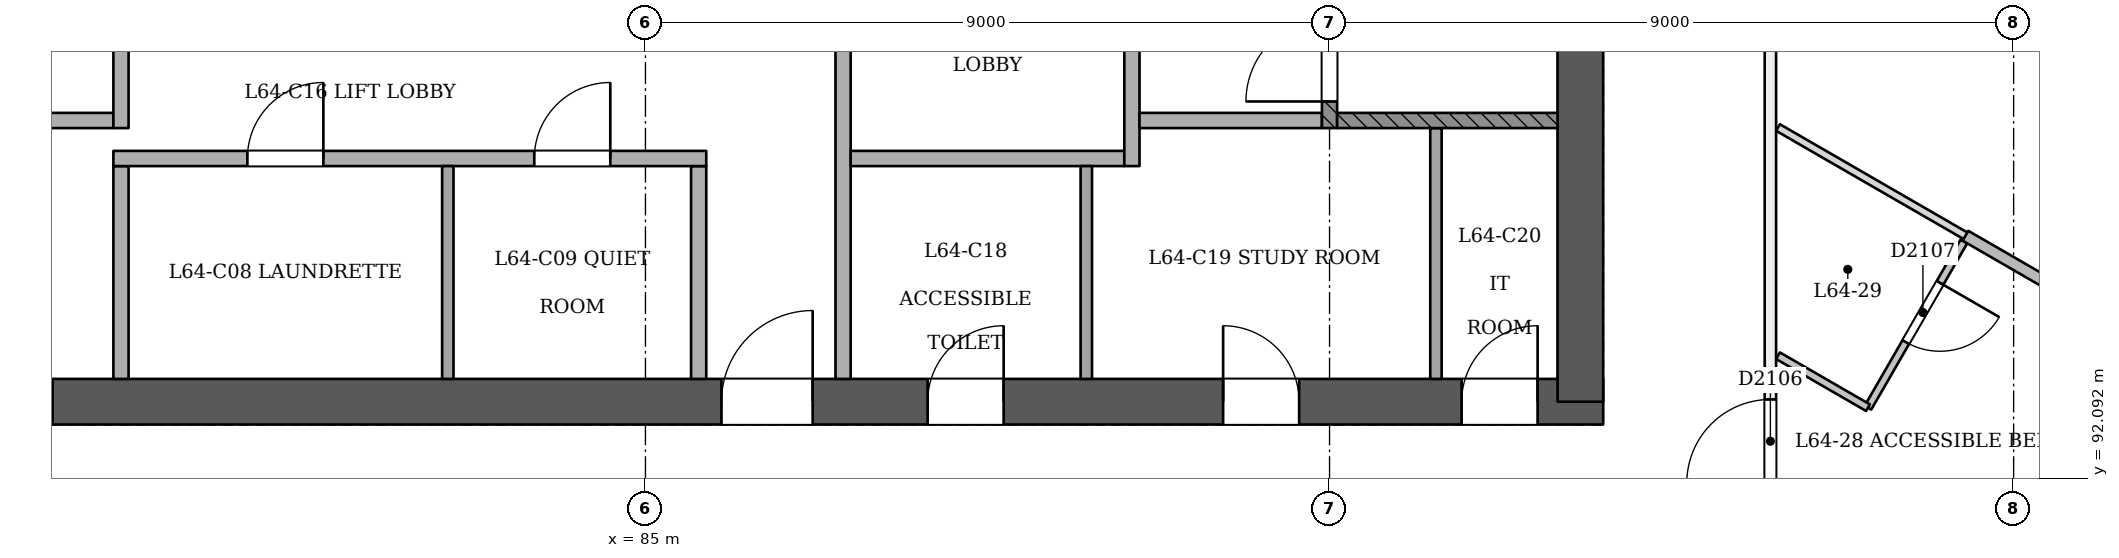
"""IFC4 building model, lengths in metres.
Left out: names, types, materials, properties, quantities, classifications, styles, units other than length and angle.
Written with IfcOpenShell. Run it as: python <this file> out.ifc"""

import sys

from ifc_helpers import new_model, si_unit, direction, frame, frame_2d, origin, place, context, subcontext, project, spatial, rectangle, extrude, element, fill, save


model = new_model("IFC4")
c1 = context("Model", 3, precision=1e-05, world=origin(), true_north=direction((0.0, 1.0)))
c2 = subcontext(c1, "Body", "Model", "MODEL_VIEW")
j1 = project(units=[si_unit("LENGTHUNIT", "METRE"), si_unit("PLANEANGLEUNIT", "RADIAN")], contexts=[c1])
p1 = place(None, origin())
s1 = spatial("IfcSite", under=j1, at=p1, CompositionType="ELEMENT")
p2 = place(p1, origin())
s2 = spatial("IfcBuilding", under=s1, at=p2, CompositionType="ELEMENT")
p3 = place(p2, frame((0.0, 0.0, 250.0)))
s3 = spatial("IfcBuildingStorey", under=s2, at=p3, CompositionType="ELEMENT", Elevation=250.0)
p4 = place(p3, frame((72.7, 93.1, 0.0), z_axis=(0.0, 0.0, 1.0), x_axis=(1.0, 0.0, 0.0)))
e1 = element("IfcWall", 1, at=p4, inside=s3, PredefinedType="SHEAR", context=c2, shape_type="SweptSolid", body=[
    extrude(rectangle(XDim=24.9, YDim=0.6, at=frame_2d((12.45, 0.0))), origin(), (0.0, 0.0, 1.0), 3.6),
])
p5 = place(p4, frame((1.1, 0.0, 0.0)))
e2 = element("IfcOpeningElement", 2, at=p5, cuts=e1, PredefinedType="OPENING", context=c2, shape_type="SweptSolid", body=[
    extrude(rectangle(XDim=1.2, YDim=2.1, at=frame_2d((0.6, 1.05))), frame((0.0, 0.311, 0.0), z_axis=(0.0, -1.0, 0.0), x_axis=(1.0, 0.0, 0.0)), (0.0, 0.0, 1.0), 0.621),
])
p6 = place(p4, frame((3.3, 0.0, 0.0)))
e3 = element("IfcOpeningElement", 3, at=p6, cuts=e1, PredefinedType="OPENING", context=c2, shape_type="SweptSolid", body=[
    extrude(rectangle(XDim=1.2, YDim=2.1, at=frame_2d((0.6, 1.05))), frame((0.0, 0.311, 0.0), z_axis=(0.0, -1.0, 0.0), x_axis=(1.0, 0.0, 0.0)), (0.0, 0.0, 1.0), 0.621),
])
p7 = place(p4, frame((13.3, 0.0, 0.0)))
e4 = element("IfcOpeningElement", 4, at=p7, cuts=e1, PredefinedType="OPENING", context=c2, shape_type="SweptSolid", body=[
    extrude(rectangle(XDim=1.2, YDim=2.1, at=frame_2d((0.6, 1.05))), frame((0.0, 0.311, 0.0), z_axis=(0.0, -1.0, 0.0), x_axis=(1.0, 0.0, 0.0)), (0.0, 0.0, 1.0), 0.621),
])
p8 = place(p4, frame((16.012, 0.0, 0.0)))
e5 = element("IfcOpeningElement", 5, at=p8, cuts=e1, PredefinedType="OPENING", context=c2, shape_type="SweptSolid", body=[
    extrude(rectangle(XDim=1.0, YDim=2.1, at=frame_2d((0.5, 1.05))), frame((0.0, 0.311, 0.0), z_axis=(0.0, -1.0, 0.0), x_axis=(1.0, 0.0, 0.0)), (0.0, 0.0, 1.0), 0.621),
])
p9 = place(p4, frame((19.9, 0.0, 0.0)))
e6 = element("IfcOpeningElement", 6, at=p9, cuts=e1, PredefinedType="OPENING", context=c2, shape_type="SweptSolid", body=[
    extrude(rectangle(XDim=1.0, YDim=2.1, at=frame_2d((0.5, 1.05))), frame((0.0, 0.311, 0.0), z_axis=(0.0, -1.0, 0.0), x_axis=(1.0, 0.0, 0.0)), (0.0, 0.0, 1.0), 0.621),
])
p10 = place(p4, frame((23.038, 0.0, 0.0)))
e7 = element("IfcOpeningElement", 7, at=p10, cuts=e1, PredefinedType="OPENING", context=c2, shape_type="SweptSolid", body=[
    extrude(rectangle(XDim=1.0, YDim=2.1, at=frame_2d((0.5, 1.05))), frame((0.0, 0.311, 0.0), z_axis=(0.0, -1.0, 0.0), x_axis=(1.0, 0.0, 0.0)), (0.0, 0.0, 1.0), 0.621),
])
p11 = place(p3, frame((97.3, 93.1, 0.0), z_axis=(0.0, 0.0, 1.0), x_axis=(0.0, 1.0, 0.0)))
e8 = element("IfcWall", 8, at=p11, inside=s3, PredefinedType="SHEAR", context=c2, shape_type="SweptSolid", body=[
    extrude(rectangle(XDim=10.9, YDim=0.6, at=frame_2d((5.45, 0.0))), origin(), (0.0, 0.0, 1.0), 3.6),
])
p12 = place(p3, frame((99.8, 91.569, 0.0), z_axis=(0.0, 0.0, 1.0), x_axis=(0.0, 1.0, 0.0)))
e9 = element("IfcWall", 9, at=p12, inside=s3, PredefinedType="PARTITIONING", context=c2, shape_type="SweptSolid", body=[
    extrude(rectangle(XDim=6.23, YDim=0.15, at=frame_2d((3.115, 0.0))), origin(), (0.0, 0.0, 1.0), 3.2),
])
p13 = place(p12, frame((0.461, 0.0, 0.0)))
e10 = element("IfcOpeningElement", 10, at=p13, cuts=e9, PredefinedType="OPENING", context=c2, shape_type="SweptSolid", body=[
    extrude(rectangle(XDim=1.1, YDim=2.1, at=frame_2d((0.55, 1.05))), frame((0.0, 0.085, 0.0), z_axis=(0.0, -1.0, 0.0), x_axis=(1.0, 0.0, 0.0)), (0.0, 0.0, 1.0), 0.171),
])
p14 = place(p3, frame((102.346, 95.208, 0.0), z_axis=(0.0, 0.0, 1.0), x_axis=(-0.499976333282, -0.866039067339, 0.0)))
e11 = element("IfcWall", 11, at=p14, inside=s3, PredefinedType="PARTITIONING", context=c2, shape_type="SweptSolid", body=[
    extrude(rectangle(XDim=2.525, YDim=0.1, at=frame_2d((1.262, 0.0))), origin(), (0.0, 0.0, 1.0), 3.2),
])
p15 = place(p14, frame((0.629, 0.0, 0.0)))
e12 = element("IfcOpeningElement", 12, at=p15, cuts=e11, PredefinedType="OPENING", context=c2, shape_type="SweptSolid", body=[
    extrude(rectangle(XDim=0.9, YDim=2.1, at=frame_2d((0.45, 1.05))), frame((0.0, 0.061, 0.0), z_axis=(0.0, -1.0, 0.0), x_axis=(1.0, 0.0, 0.0)), (0.0, 0.0, 1.0), 0.121),
])
p16 = place(p3, frame((101.083, 93.022, 0.0), z_axis=(0.0, 0.0, 1.0), x_axis=(-0.8660249478, 0.500000789788, 0.0)))
e13 = element("IfcWall", 13, at=p16, inside=s3, PredefinedType="PARTITIONING", context=c2, shape_type="SweptSolid", body=[
    extrude(rectangle(XDim=1.367, YDim=0.1, at=frame_2d((0.683, 0.0))), origin(), (0.0, 0.0, 1.0), 3.2),
])
p17 = place(p3, frame((104.895, 93.823, 0.0), z_axis=(0.0, 0.0, 1.0), x_axis=(-0.866032430508, 0.49998782916, 0.0)))
e14 = element("IfcWall", 14, at=p17, inside=s3, PredefinedType="PARTITIONING", context=c2, shape_type="SweptSolid", body=[
    extrude(rectangle(XDim=2.92, YDim=0.15, at=frame_2d((1.46, 0.0))), origin(), (0.0, 0.0, 1.0), 2.7),
])
p18 = place(p3, frame((102.401, 95.263, 0.0), z_axis=(0.0, 0.0, 1.0), x_axis=(-0.866039173598, 0.499976149225, 0.0)))
e15 = element("IfcWall", 15, at=p18, inside=s3, PredefinedType="PARTITIONING", context=c2, shape_type="SweptSolid", body=[
    extrude(rectangle(XDim=2.888, YDim=0.1, at=frame_2d((1.444, 0.0))), origin(), (0.0, 0.0, 1.0), 3.2),
])
p19 = place(p3, frame((78.1, 93.4, 0.0), z_axis=(0.0, 0.0, 1.0), x_axis=(0.0, 1.0, 0.0)))
e16 = element("IfcWall", 16, at=p19, inside=s3, PredefinedType="PARTITIONING", context=c2, shape_type="SweptSolid", body=[
    extrude(rectangle(XDim=2.8, YDim=0.2, at=frame_2d((1.4, 0.0))), origin(), (0.0, 0.0, 1.0), 3.2),
])
p20 = place(p3, frame((82.4, 93.4, 0.0), z_axis=(0.0, 0.0, 1.0), x_axis=(0.0, 1.0, 0.0)))
e17 = element("IfcWall", 17, at=p20, inside=s3, PredefinedType="PARTITIONING", context=c2, shape_type="SweptSolid", body=[
    extrude(rectangle(XDim=2.8, YDim=0.15, at=frame_2d((1.4, 0.0))), origin(), (0.0, 0.0, 1.0), 3.2),
])
p21 = place(p3, frame((85.7, 93.4, 0.0), z_axis=(0.0, 0.0, 1.0), x_axis=(0.0, 1.0, 0.0)))
e18 = element("IfcWall", 18, at=p21, inside=s3, PredefinedType="PARTITIONING", context=c2, shape_type="SweptSolid", body=[
    extrude(rectangle(XDim=2.8, YDim=0.2, at=frame_2d((1.4, 0.0))), origin(), (0.0, 0.0, 1.0), 3.2),
])
p22 = place(p3, frame((87.6, 93.4, 0.0), z_axis=(0.0, 0.0, 1.0), x_axis=(0.0, 1.0, 0.0)))
e19 = element("IfcWall", 19, at=p22, inside=s3, PredefinedType="PARTITIONING", context=c2, shape_type="SweptSolid", body=[
    extrude(rectangle(XDim=7.0, YDim=0.2, at=frame_2d((3.5, 0.0))), origin(), (0.0, 0.0, 1.0), 3.2),
])
p23 = place(p22, frame((4.45, 0.0, 0.0)))
e20 = element("IfcOpeningElement", 20, at=p23, cuts=e19, PredefinedType="OPENING", context=c2, shape_type="SweptSolid", body=[
    extrude(rectangle(XDim=1.1, YDim=2.1, at=frame_2d((0.55, 1.05))), frame((0.0, 0.11, 0.0), z_axis=(0.0, -1.0, 0.0), x_axis=(1.0, 0.0, 0.0)), (0.0, 0.0, 1.0), 0.221),
])
p24 = place(p3, frame((90.8, 93.4, 0.0), z_axis=(0.0, 0.0, 1.0), x_axis=(0.0, 1.0, 0.0)))
e21 = element("IfcWall", 21, at=p24, inside=s3, PredefinedType="PARTITIONING", context=c2, shape_type="SweptSolid", body=[
    extrude(rectangle(XDim=2.8, YDim=0.15, at=frame_2d((1.4, 0.0))), origin(), (0.0, 0.0, 1.0), 3.2),
])
p25 = place(p3, frame((95.4, 93.4, 0.0), z_axis=(0.0, 0.0, 1.0), x_axis=(0.0, 1.0, 0.0)))
e22 = element("IfcWall", 22, at=p25, inside=s3, PredefinedType="PARTITIONING", context=c2, shape_type="SweptSolid", body=[
    extrude(rectangle(XDim=3.3, YDim=0.15, at=frame_2d((1.65, 0.0))), origin(), (0.0, 0.0, 1.0), 3.2),
])
p26 = place(p3, frame((78.0, 96.3, 0.0), z_axis=(0.0, 0.0, 1.0), x_axis=(1.0, 0.0, 0.0)))
e23 = element("IfcWall", 23, at=p26, inside=s3, PredefinedType="PARTITIONING", context=c2, shape_type="SweptSolid", body=[
    extrude(rectangle(XDim=7.8, YDim=0.2, at=frame_2d((3.9, 0.0))), origin(), (0.0, 0.0, 1.0), 3.2),
])
p27 = place(p26, frame((1.762, 0.0, 0.0)))
e24 = element("IfcOpeningElement", 24, at=p27, cuts=e23, PredefinedType="OPENING", context=c2, shape_type="SweptSolid", body=[
    extrude(rectangle(XDim=1.0, YDim=2.1, at=frame_2d((0.5, 1.05))), frame((0.0, 0.11, 0.0), z_axis=(0.0, -1.0, 0.0), x_axis=(1.0, 0.0, 0.0)), (0.0, 0.0, 1.0), 0.221),
])
p28 = place(p26, frame((5.538, 0.0, 0.0)))
e25 = element("IfcOpeningElement", 25, at=p28, cuts=e23, PredefinedType="OPENING", context=c2, shape_type="SweptSolid", body=[
    extrude(rectangle(XDim=1.0, YDim=2.1, at=frame_2d((0.5, 1.05))), frame((0.0, 0.11, 0.0), z_axis=(0.0, -1.0, 0.0), x_axis=(1.0, 0.0, 0.0)), (0.0, 0.0, 1.0), 0.221),
])
p29 = place(p3, frame((87.7, 96.3, 0.0), z_axis=(0.0, 0.0, 1.0), x_axis=(1.0, 0.0, 0.0)))
e26 = element("IfcWall", 26, at=p29, inside=s3, PredefinedType="PARTITIONING", context=c2, shape_type="SweptSolid", body=[
    extrude(rectangle(XDim=3.6, YDim=0.2, at=frame_2d((1.8, 0.0))), origin(), (0.0, 0.0, 1.0), 3.2),
])
p30 = place(p3, frame((91.4, 96.2, 0.0), z_axis=(0.0, 0.0, 1.0), x_axis=(0.0, 1.0, 0.0)))
e27 = element("IfcWall", 27, at=p30, inside=s3, PredefinedType="PARTITIONING", context=c2, shape_type="SweptSolid", body=[
    extrude(rectangle(XDim=4.2, YDim=0.2, at=frame_2d((2.1, 0.0))), origin(), (0.0, 0.0, 1.0), 3.2),
])
p31 = place(p30, frame((2.45, 0.0, 0.0)))
e28 = element("IfcOpeningElement", 28, at=p31, cuts=e27, PredefinedType="OPENING", context=c2, shape_type="SweptSolid", body=[
    extrude(rectangle(XDim=1.1, YDim=2.1, at=frame_2d((0.55, 1.05))), frame((0.0, 0.11, 0.0), z_axis=(0.0, -1.0, 0.0), x_axis=(1.0, 0.0, 0.0)), (0.0, 0.0, 1.0), 0.221),
])
p32 = place(p3, frame((76.1, 96.8, 0.0), z_axis=(0.0, 0.0, 1.0), x_axis=(1.0, 0.0, 0.0)))
e29 = element("IfcWall", 29, at=p32, inside=s3, PredefinedType="PARTITIONING", context=c2, shape_type="SweptSolid", body=[
    extrude(rectangle(XDim=1.9, YDim=0.2, at=frame_2d((0.95, 0.0))), origin(), (0.0, 0.0, 1.0), 3.2),
])
p33 = place(p3, frame((78.1, 96.7, 0.0), z_axis=(0.0, 0.0, 1.0), x_axis=(0.0, 1.0, 0.0)))
e30 = element("IfcWall", 30, at=p33, inside=s3, PredefinedType="PARTITIONING", context=c2, shape_type="SweptSolid", body=[
    extrude(rectangle(XDim=3.7, YDim=0.2, at=frame_2d((1.85, 0.0))), origin(), (0.0, 0.0, 1.0), 3.2),
])
p34 = place(p33, frame((1.95, 0.0, 0.0)))
e31 = element("IfcOpeningElement", 31, at=p34, cuts=e30, PredefinedType="OPENING", context=c2, shape_type="SweptSolid", body=[
    extrude(rectangle(XDim=1.1, YDim=2.1, at=frame_2d((0.55, 1.05))), frame((0.0, 0.11, 0.0), z_axis=(0.0, -1.0, 0.0), x_axis=(1.0, 0.0, 0.0)), (0.0, 0.0, 1.0), 0.221),
])
p35 = place(p3, frame((91.5, 96.8, 0.0), z_axis=(0.0, 0.0, 1.0), x_axis=(1.0, 0.0, 0.0)))
e32 = element("IfcWall", 32, at=p35, inside=s3, PredefinedType="PARTITIONING", context=c2, shape_type="SweptSolid", body=[
    extrude(rectangle(XDim=2.4, YDim=0.2, at=frame_2d((1.2, 0.0))), origin(), (0.0, 0.0, 1.0), 3.2),
])
p36 = place(p3, frame((94.0, 96.7, 0.0), z_axis=(0.0, 0.0, 1.0), x_axis=(0.0, 1.0, 0.0)))
e33 = element("IfcWall", 33, at=p36, inside=s3, PredefinedType="SOLIDWALL", context=c2, shape_type="SweptSolid", body=[
    extrude(rectangle(XDim=3.7, YDim=0.2, at=frame_2d((1.85, 0.0))), origin(), (0.0, 0.0, 1.0), 3.2),
])
p37 = place(p36, frame((0.35, 0.0, 0.0)))
e34 = element("IfcOpeningElement", 34, at=p37, cuts=e33, PredefinedType="OPENING", context=c2, shape_type="SweptSolid", body=[
    extrude(rectangle(XDim=1.1, YDim=2.1, at=frame_2d((0.55, 1.05))), frame((0.0, 0.11, 0.0), z_axis=(0.0, -1.0, 0.0), x_axis=(1.0, 0.0, 0.0)), (0.0, 0.0, 1.0), 0.221),
])
p38 = place(p3, frame((94.1, 96.8, 0.0), z_axis=(0.0, 0.0, 1.0), x_axis=(1.0, 0.0, 0.0)))
e35 = element("IfcWall", 35, at=p38, inside=s3, PredefinedType="SOLIDWALL", context=c2, shape_type="SweptSolid", body=[
    extrude(rectangle(XDim=2.9, YDim=0.2, at=frame_2d((1.45, 0.0))), origin(), (0.0, 0.0, 1.0), 3.2),
])
p39 = place(p13, origin())
e36 = element("IfcDoor", 36, at=p39, inside=s3, OperationType="SINGLE_SWING_LEFT", PredefinedType="NOTDEFINED", context=c2, shape_type="SweptSolid", body=[
    extrude(rectangle(XDim=1.1, YDim=2.1, at=frame_2d((0.55, 1.05))), frame((0.0, 0.025, 0.0), z_axis=(0.0, -1.0, 0.0), x_axis=(1.0, 0.0, 0.0)), (0.0, 0.0, 1.0), 0.05),
])
fill(e10, e36)
p40 = place(p15, origin())
e37 = element("IfcDoor", 37, at=p40, inside=s3, OperationType="SINGLE_SWING_LEFT", PredefinedType="NOTDEFINED", context=c2, shape_type="SweptSolid", body=[
    extrude(rectangle(XDim=0.9, YDim=2.1, at=frame_2d((0.45, 1.05))), frame((0.0, 0.025, 0.0), z_axis=(0.0, -1.0, 0.0), x_axis=(1.0, 0.0, 0.0)), (0.0, 0.0, 1.0), 0.05),
])
fill(e12, e37)
p41 = place(p37, origin())
e38 = element("IfcDoor", 38, at=p41, inside=s3, OperationType="SINGLE_SWING_LEFT", PredefinedType="NOTDEFINED", context=c2, shape_type="SweptSolid", body=[
    extrude(rectangle(XDim=1.1, YDim=2.1, at=frame_2d((0.55, 1.05))), frame((0.0, 0.025, 0.0), z_axis=(0.0, -1.0, 0.0), x_axis=(1.0, 0.0, 0.0)), (0.0, 0.0, 1.0), 0.05),
])
fill(e34, e38)
p42 = place(p6, origin())
e39 = element("IfcDoor", 39, at=p42, inside=s3, OperationType="SINGLE_SWING_LEFT", PredefinedType="NOTDEFINED", context=c2, shape_type="SweptSolid", body=[
    extrude(rectangle(XDim=1.2, YDim=2.1, at=frame_2d((0.6, 1.05))), frame((0.0, 0.025, 0.0), z_axis=(0.0, -1.0, 0.0), x_axis=(1.0, 0.0, 0.0)), (0.0, 0.0, 1.0), 0.05),
])
fill(e3, e39)
p43 = place(p7, origin())
e40 = element("IfcDoor", 40, at=p43, inside=s3, OperationType="SINGLE_SWING_RIGHT", PredefinedType="NOTDEFINED", context=c2, shape_type="SweptSolid", body=[
    extrude(rectangle(XDim=1.2, YDim=2.1, at=frame_2d((0.6, 1.05))), frame((0.0, 0.025, 0.0), z_axis=(0.0, -1.0, 0.0), x_axis=(1.0, 0.0, 0.0)), (0.0, 0.0, 1.0), 0.05),
])
fill(e4, e40)
p44 = place(p8, origin())
e41 = element("IfcDoor", 41, at=p44, inside=s3, OperationType="SINGLE_SWING_RIGHT", PredefinedType="NOTDEFINED", context=c2, shape_type="SweptSolid", body=[
    extrude(rectangle(XDim=1.0, YDim=2.1, at=frame_2d((0.5, 1.05))), frame((0.0, 0.025, 0.0), z_axis=(0.0, -1.0, 0.0), x_axis=(1.0, 0.0, 0.0)), (0.0, 0.0, 1.0), 0.05),
])
fill(e5, e41)
p45 = place(p9, origin())
e42 = element("IfcDoor", 42, at=p45, inside=s3, OperationType="SINGLE_SWING_LEFT", PredefinedType="NOTDEFINED", context=c2, shape_type="SweptSolid", body=[
    extrude(rectangle(XDim=1.0, YDim=2.1, at=frame_2d((0.5, 1.05))), frame((0.0, 0.025, 0.0), z_axis=(0.0, -1.0, 0.0), x_axis=(1.0, 0.0, 0.0)), (0.0, 0.0, 1.0), 0.05),
])
fill(e6, e42)
p46 = place(p10, origin())
e43 = element("IfcDoor", 43, at=p46, inside=s3, OperationType="SINGLE_SWING_RIGHT", PredefinedType="NOTDEFINED", context=c2, shape_type="SweptSolid", body=[
    extrude(rectangle(XDim=1.0, YDim=2.1, at=frame_2d((0.5, 1.05))), frame((0.0, 0.025, 0.0), z_axis=(0.0, -1.0, 0.0), x_axis=(1.0, 0.0, 0.0)), (0.0, 0.0, 1.0), 0.05),
])
fill(e7, e43)
p47 = place(p27, origin())
e44 = element("IfcDoor", 44, at=p47, inside=s3, OperationType="SINGLE_SWING_RIGHT", PredefinedType="NOTDEFINED", context=c2, shape_type="SweptSolid", body=[
    extrude(rectangle(XDim=1.0, YDim=2.1, at=frame_2d((0.5, 1.05))), frame((0.0, 0.025, 0.0), z_axis=(0.0, -1.0, 0.0), x_axis=(1.0, 0.0, 0.0)), (0.0, 0.0, 1.0), 0.05),
])
fill(e24, e44)
p48 = place(p28, origin())
e45 = element("IfcDoor", 45, at=p48, inside=s3, OperationType="SINGLE_SWING_RIGHT", PredefinedType="NOTDEFINED", context=c2, shape_type="SweptSolid", body=[
    extrude(rectangle(XDim=1.0, YDim=2.1, at=frame_2d((0.5, 1.05))), frame((0.0, 0.025, 0.0), z_axis=(0.0, -1.0, 0.0), x_axis=(1.0, 0.0, 0.0)), (0.0, 0.0, 1.0), 0.05),
])
fill(e25, e45)
save(model, sys.argv[1])
